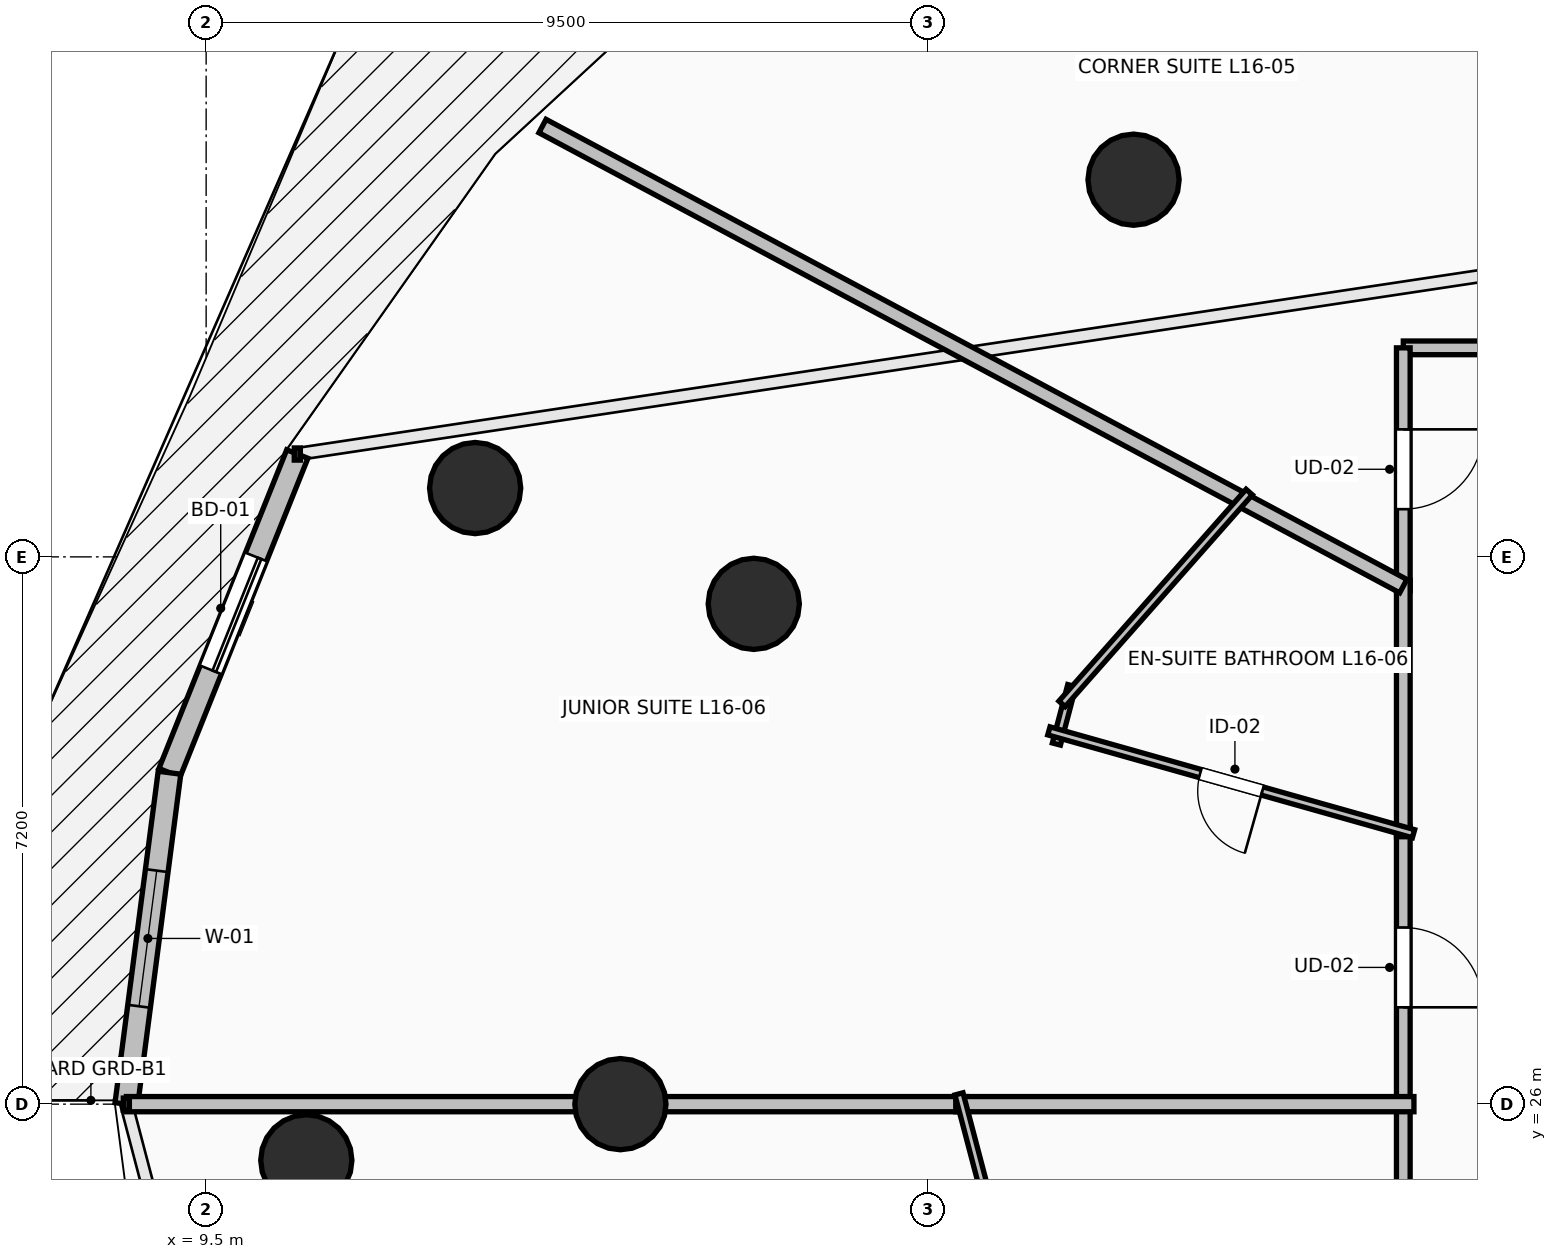
"""IFC4 building model, lengths in metres.
Left out: names, types, materials, properties, quantities, classifications, styles, units other than length and angle.
Written with IfcOpenShell. Run it as: python <this file> out.ifc"""

import sys

from ifc_helpers import new_model, si_unit, direction, frame, frame_2d, origin, origin_2d, place, context, subcontext, project, spatial, rectangle, circle, extrude, element, fill, save


model = new_model("IFC4")
c1 = context("Model", 3, precision=1e-05, world=origin(), true_north=direction((0.0, 1.0)))
c2 = subcontext(c1, "Body", "Model", "MODEL_VIEW")
j1 = project(units=[si_unit("LENGTHUNIT", "METRE"), si_unit("PLANEANGLEUNIT", "RADIAN")], contexts=[c1])
p1 = place(None, origin())
s1 = spatial("IfcSite", under=j1, at=p1, CompositionType="ELEMENT")
p2 = place(p1, origin())
s2 = spatial("IfcBuilding", under=s1, at=p2, CompositionType="ELEMENT")
p3 = place(p2, frame((0.0, 0.0, 62.5)))
s3 = spatial("IfcBuildingStorey", under=s2, at=p3, CompositionType="ELEMENT", Elevation=62.5)
for number, where, z_axis, x_axis in (
    (1, (21.701, 38.162, 0.0), (0.0, 0.0, 1.0), (-0.707, 0.707, 0.0)),
    (2, (16.705, 32.582, 0.0), (0.0, 0.0, 1.0), (-0.924, 0.383, 0.0)),
    (3, (14.95, 26.0, 0.0), (0.0, 0.0, 1.0), (-1.0, 0.0, 0.0)),
    (4, (13.039, 34.105, 0.0), (0.0, 0.0, 1.0), (-0.924, 0.383, 0.0)),
    (5, (10.818, 25.261, 0.0), (0.0, 0.0, 1.0), (-1.0, 0.0, 0.0)),
):
    element("IfcColumn", number, at=place(p3, frame(where, z_axis=z_axis, x_axis=x_axis)), inside=s3, PredefinedType="COLUMN", context=c2, shape_type="SweptSolid", body=[
        extrude(circle(Radius=0.6, at=origin_2d()), origin(), (0.0, 0.0, 1.0), 3.5),
    ])
p4 = place(p3, frame((10.699, 34.553, 0.0), z_axis=(0.0, 0.0, 1.0), x_axis=(-0.372266423315, -0.928125912833, 0.0)))
e6 = element("IfcWall", 6, at=p4, inside=s3, PredefinedType="STANDARD", context=c2, shape_type="SweptSolid", body=[
    extrude(rectangle(XDim=4.517, YDim=0.3, at=frame_2d((2.259, 0.0))), origin(), (0.0, 0.0, 1.0), 3.24),
])
p5 = place(p4, frame((1.459, 0.0, 0.0)))
e7 = element("IfcOpeningElement", 7, at=p5, cuts=e6, PredefinedType="OPENING", context=c2, shape_type="SweptSolid", body=[
    extrude(rectangle(XDim=1.6, YDim=2.3, at=frame_2d((0.8, 1.15))), frame((0.0, 0.165, 0.0), z_axis=(0.0, -1.0, 0.0), x_axis=(1.0, 0.0, 0.0)), (0.0, 0.0, 1.0), 0.33),
])
p6 = place(p3, frame((9.018, 30.36, 0.0), z_axis=(0.0, 0.0, 1.0), x_axis=(-0.129144544413, -0.99162577954, 0.0)))
e8 = element("IfcWall", 8, at=p6, inside=s3, PredefinedType="STANDARD", context=c2, shape_type="SweptSolid", body=[
    extrude(rectangle(XDim=4.397, YDim=0.3, at=frame_2d((2.199, 0.0))), origin(), (0.0, 0.0, 1.0), 3.24),
])
p7 = place(p6, frame((1.299, 0.0, 0.85)))
e9 = element("IfcOpeningElement", 9, at=p7, cuts=e8, PredefinedType="OPENING", context=c2, shape_type="SweptSolid", body=[
    extrude(rectangle(XDim=1.8, YDim=2.19, at=frame_2d((0.9, 1.095))), frame((0.0, 0.165, 0.0), z_axis=(0.0, -1.0, 0.0), x_axis=(1.0, 0.0, 0.0)), (0.0, 0.0, 1.0), 0.33),
])
p8 = place(p3, frame((27.711, 35.95, 0.0), z_axis=(0.0, 0.0, 1.0), x_axis=(-1.0, 0.0, 0.0)))
e10 = element("IfcWall", 10, at=p8, inside=s3, PredefinedType="PARTITIONING", context=c2, shape_type="SweptSolid", body=[
    extrude(rectangle(XDim=2.461, YDim=0.18, at=frame_2d((1.23, 0.0))), origin(), (0.0, 0.0, 1.0), 2.432),
])
p9 = place(p3, frame((25.25, 35.95, 0.0), z_axis=(0.0, 0.0, 1.0), x_axis=(0.0, -1.0, 0.0)))
e11 = element("IfcWall", 11, at=p9, inside=s3, PredefinedType="PARTITIONING", context=c2, shape_type="SweptSolid", body=[
    extrude(rectangle(XDim=3.195, YDim=0.18, at=frame_2d((1.598, 0.0))), origin(), (0.0, 0.0, 1.0), 2.432),
])
p10 = place(p9, frame((1.073, 0.0, 0.0)))
e12 = element("IfcOpeningElement", 12, at=p10, cuts=e11, PredefinedType="OPENING", context=c2, shape_type="SweptSolid", body=[
    extrude(rectangle(XDim=1.05, YDim=2.2, at=frame_2d((0.525, 1.1))), frame((0.0, 0.105, 0.0), z_axis=(0.0, -1.0, 0.0), x_axis=(1.0, 0.0, 0.0)), (0.0, 0.0, 1.0), 0.21),
])
p11 = place(p3, frame((25.25, 29.658, 0.0), z_axis=(0.0, 0.0, 1.0), x_axis=(0.0, -1.0, 0.0)))
e13 = element("IfcWall", 13, at=p11, inside=s3, PredefinedType="PARTITIONING", context=c2, shape_type="SweptSolid", body=[
    extrude(rectangle(XDim=3.718, YDim=0.18, at=frame_2d((1.859, 0.0))), origin(), (0.0, 0.0, 1.0), 2.432),
])
p12 = place(p11, frame((1.334, 0.0, 0.0)))
e14 = element("IfcOpeningElement", 14, at=p12, cuts=e13, PredefinedType="OPENING", context=c2, shape_type="SweptSolid", body=[
    extrude(rectangle(XDim=1.05, YDim=2.2, at=frame_2d((0.525, 1.1))), frame((0.0, 0.105, 0.0), z_axis=(0.0, -1.0, 0.0), x_axis=(1.0, 0.0, 0.0)), (0.0, 0.0, 1.0), 0.21),
])
p13 = place(p3, frame((25.25, 32.895, 0.0), z_axis=(0.0, 0.0, 1.0), x_axis=(0.0, -1.0, 0.0)))
e15 = element("IfcWall", 15, at=p13, inside=s3, PredefinedType="PARTITIONING", context=c2, shape_type="SweptSolid", body=[
    extrude(rectangle(XDim=3.377, YDim=0.18, at=frame_2d((1.688, 0.0))), origin(), (0.0, 0.0, 1.0), 3.24),
])
p14 = place(p3, frame((25.25, 26.08, 0.0), z_axis=(0.0, 0.0, 1.0), x_axis=(0.0, -1.0, 0.0)))
e16 = element("IfcWall", 16, at=p14, inside=s3, PredefinedType="PARTITIONING", context=c2, shape_type="SweptSolid", body=[
    extrude(rectangle(XDim=2.957, YDim=0.18, at=frame_2d((1.479, 0.0))), origin(), (0.0, 0.0, 1.0), 3.24),
])
p15 = place(p3, frame((24.733, 45.856, 0.0), z_axis=(0.0, 0.0, 1.0), x_axis=(0.555564858458, -0.831473203444, 0.0)))
e17 = element("IfcWall", 17, at=p15, inside=s3, PredefinedType="PARTITIONING", context=c2, shape_type="SweptSolid", body=[
    extrude(rectangle(XDim=9.054, YDim=0.2, at=frame_2d((4.527, 0.0))), origin(), (0.0, 0.0, 1.0), 2.432),
])
p16 = place(p3, frame((13.925, 38.868, 0.0), z_axis=(0.0, 0.0, 1.0), x_axis=(0.881932077496, -0.471376506292, 0.0)))
e18 = element("IfcWall", 18, at=p16, inside=s3, PredefinedType="PARTITIONING", context=c2, shape_type="SweptSolid", body=[
    extrude(rectangle(XDim=12.841, YDim=0.2, at=frame_2d((6.42, 0.0))), origin(), (0.0, 0.0, 1.0), 2.624),
])
p17 = place(p3, frame((20.686, 30.738, 0.0), z_axis=(0.0, 0.0, 1.0), x_axis=(0.254583995409, 0.967050665313, 0.0)))
e19 = element("IfcWall", 19, at=p17, inside=s3, PredefinedType="PARTITIONING", context=c2, shape_type="SweptSolid", body=[
    extrude(rectangle(XDim=0.795, YDim=0.11, at=frame_2d((0.397, 0.0))), origin(), (0.0, 0.0, 1.0), 2.432),
])
p18 = place(p3, frame((20.76, 31.266, 0.0), z_axis=(0.0, 0.0, 1.0), x_axis=(0.662136072578, 0.74938362765, 0.0)))
e20 = element("IfcWall", 20, at=p18, inside=s3, PredefinedType="PARTITIONING", context=c2, shape_type="SweptSolid", body=[
    extrude(rectangle(XDim=3.719, YDim=0.11, at=frame_2d((1.859, 0.0))), origin(), (0.0, 0.0, 1.0), 3.24),
])
p19 = place(p3, frame((25.385, 29.558, 0.0), z_axis=(0.0, 0.0, 1.0), x_axis=(-0.962466408657, 0.271400833098, 0.0)))
e21 = element("IfcWall", 21, at=p19, inside=s3, PredefinedType="PARTITIONING", context=c2, shape_type="SweptSolid", body=[
    extrude(rectangle(XDim=4.984, YDim=0.11, at=frame_2d((2.492, 0.0))), origin(), (0.0, 0.0, 1.0), 2.432),
])
p20 = place(p19, frame((2.067, 0.0, 0.0)))
e22 = element("IfcOpeningElement", 22, at=p20, cuts=e21, PredefinedType="OPENING", context=c2, shape_type="SweptSolid", body=[
    extrude(rectangle(XDim=0.85, YDim=2.1, at=frame_2d((0.425, 1.05))), frame((0.0, 0.07, 0.0), z_axis=(0.0, -1.0, 0.0), x_axis=(1.0, 0.0, 0.0)), (0.0, 0.0, 1.0), 0.14),
])
p21 = place(p3, frame((8.451, 26.0, 0.0), z_axis=(0.0, 0.0, 1.0), x_axis=(1.0, 0.0, 0.0)))
e23 = element("IfcWall", 23, at=p21, inside=s3, PredefinedType="PARTITIONING", context=c2, shape_type="SweptSolid", body=[
    extrude(rectangle(XDim=11.051, YDim=0.2, at=frame_2d((5.525, 0.0))), origin(), (0.0, 0.0, 1.0), 2.432),
])
p22 = place(p3, frame((19.362, 26.0, 0.0), z_axis=(0.0, 0.0, 1.0), x_axis=(1.0, 0.0, 0.0)))
e24 = element("IfcWall", 24, at=p22, inside=s3, PredefinedType="PARTITIONING", context=c2, shape_type="SweptSolid", body=[
    extrude(rectangle(XDim=6.028, YDim=0.2, at=frame_2d((3.014, 0.0))), origin(), (0.0, 0.0, 1.0), 2.874),
])
p23 = place(p3, frame((20.489, 22.015, 0.0), z_axis=(0.0, 0.0, 1.0), x_axis=(-0.254448175288, 0.967086410872, 0.0)))
e25 = element("IfcWall", 25, at=p23, inside=s3, PredefinedType="PARTITIONING", context=c2, shape_type="SweptSolid", body=[
    extrude(rectangle(XDim=4.261, YDim=0.11, at=frame_2d((2.13, 0.0))), origin(), (0.0, 0.0, 1.0), 3.24),
])
p24 = place(p5, origin())
e26 = element("IfcDoor", 26, at=p24, inside=s3, OperationType="SLIDING_TO_LEFT", PredefinedType="DOOR", context=c2, shape_type="SweptSolid", body=[
    extrude(rectangle(XDim=1.6, YDim=2.3, at=frame_2d((0.8, 1.15))), frame((0.0, 0.025, 0.0), z_axis=(0.0, -1.0, 0.0), x_axis=(1.0, 0.0, 0.0)), (0.0, 0.0, 1.0), 0.05),
])
fill(e7, e26)
p25 = place(p7, origin())
e27 = element("IfcWindow", 27, at=p25, inside=s3, PartitioningType="SINGLE_PANEL", PredefinedType="WINDOW", context=c2, shape_type="SweptSolid", body=[
    extrude(rectangle(XDim=1.8, YDim=2.19, at=frame_2d((0.9, 1.095))), frame((0.0, 0.03, 0.0), z_axis=(0.0, -1.0, 0.0), x_axis=(1.0, 0.0, 0.0)), (0.0, 0.0, 1.0), 0.06),
])
fill(e9, e27)
p26 = place(p10, origin())
e28 = element("IfcDoor", 28, at=p26, inside=s3, OperationType="SINGLE_SWING_LEFT", PredefinedType="DOOR", context=c2, shape_type="SweptSolid", body=[
    extrude(rectangle(XDim=1.05, YDim=2.2, at=frame_2d((0.525, 1.1))), frame((0.0, 0.025, 0.0), z_axis=(0.0, -1.0, 0.0), x_axis=(1.0, 0.0, 0.0)), (0.0, 0.0, 1.0), 0.05),
])
fill(e12, e28)
p27 = place(p12, origin())
e29 = element("IfcDoor", 29, at=p27, inside=s3, OperationType="SINGLE_SWING_RIGHT", PredefinedType="DOOR", context=c2, shape_type="SweptSolid", body=[
    extrude(rectangle(XDim=1.05, YDim=2.2, at=frame_2d((0.525, 1.1))), frame((0.0, 0.025, 0.0), z_axis=(0.0, -1.0, 0.0), x_axis=(1.0, 0.0, 0.0)), (0.0, 0.0, 1.0), 0.05),
])
fill(e14, e29)
p28 = place(p20, origin())
e30 = element("IfcDoor", 30, at=p28, inside=s3, OperationType="SINGLE_SWING_LEFT", PredefinedType="DOOR", context=c2, shape_type="SweptSolid", body=[
    extrude(rectangle(XDim=0.85, YDim=2.1, at=frame_2d((0.425, 1.05))), frame((0.0, 0.025, 0.0), z_axis=(0.0, -1.0, 0.0), x_axis=(1.0, 0.0, 0.0)), (0.0, 0.0, 1.0), 0.05),
])
fill(e22, e30)
save(model, sys.argv[1])
